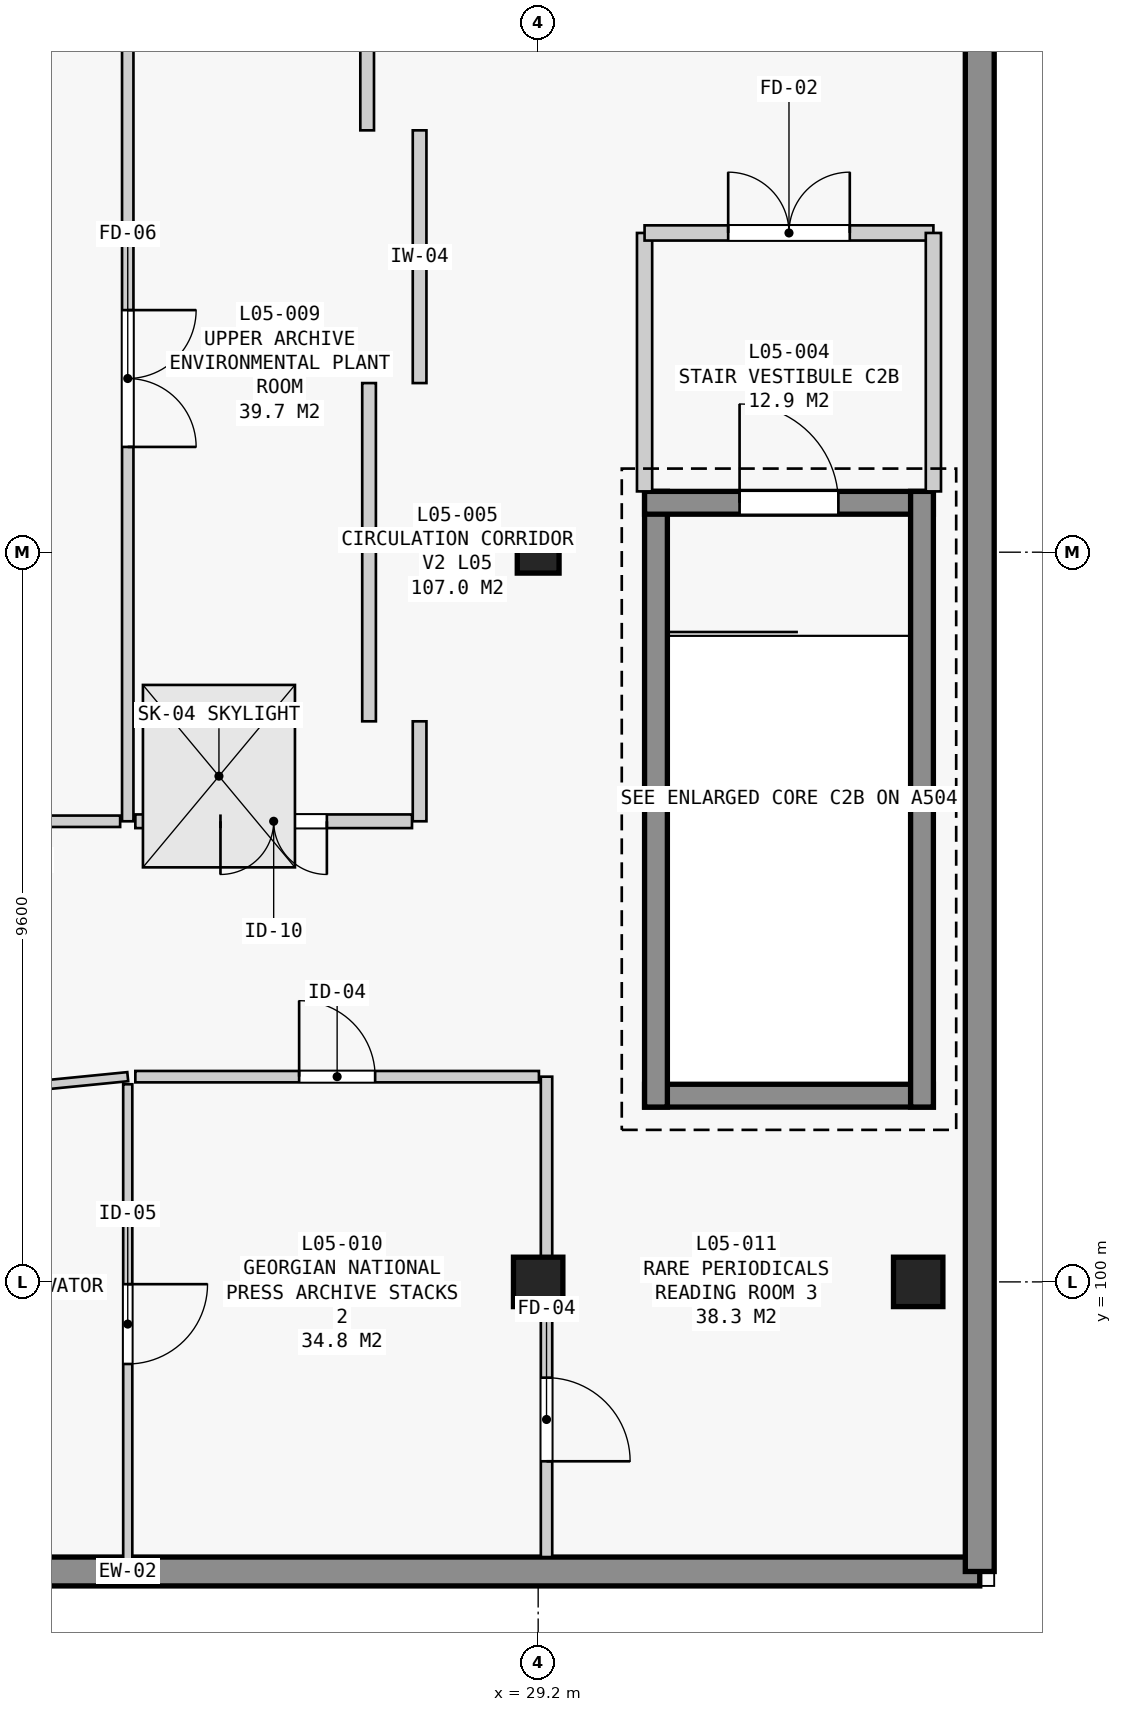
"""IFC4 building model, lengths in metres.
Left out: names, types, materials, properties, quantities, classifications, styles, units other than length and angle.
Written with IfcOpenShell. Run it as: python <this file> out.ifc"""

import sys

from ifc_helpers import new_model, si_unit, direction, frame, frame_2d, origin, origin_2d, place, context, subcontext, project, spatial, rectangle, extrude, element, fill, save


model = new_model("IFC4")
c1 = context("Model", 3, precision=1e-05, world=origin(), true_north=direction((0.0, 1.0)))
c2 = subcontext(c1, "Body", "Model", "MODEL_VIEW")
j1 = project(units=[si_unit("LENGTHUNIT", "METRE"), si_unit("PLANEANGLEUNIT", "RADIAN")], contexts=[c1])
p1 = place(None, origin())
s1 = spatial("IfcSite", under=j1, at=p1, CompositionType="ELEMENT")
p2 = place(p1, origin())
s2 = spatial("IfcBuilding", under=s1, at=p2, CompositionType="ELEMENT")
p3 = place(p2, frame((0.0, 0.0, 22.5)))
s3 = spatial("IfcBuildingStorey", under=s2, at=p3, CompositionType="ELEMENT", Elevation=22.5)
p4 = place(p3, frame((29.2, 100.0, 0.0), z_axis=(0.0, 0.0, 1.0), x_axis=(1.0, 0.0, 0.0)))
e1 = element("IfcColumn", 1, at=p4, inside=s3, PredefinedType="COLUMN", context=c2, shape_type="SweptSolid", body=[
    extrude(rectangle(XDim=0.65, YDim=0.65, at=origin_2d()), origin(), (0.0, 0.0, 1.0), 4.2),
])
p5 = place(p3, frame((29.2, 109.6, 0.0), z_axis=(0.0, 0.0, 1.0), x_axis=(1.0, 0.0, 0.0)))
e2 = element("IfcColumn", 2, at=p5, inside=s3, PredefinedType="COLUMN", context=c2, shape_type="SweptSolid", body=[
    extrude(rectangle(XDim=0.55, YDim=0.55, at=origin_2d()), origin(), (0.0, 0.0, 1.0), 4.2),
])
p6 = place(p3, frame((34.2, 100.0, 0.0), z_axis=(0.0, 0.0, 1.0), x_axis=(1.0, 0.0, 0.0)))
e3 = element("IfcColumn", 3, at=p6, inside=s3, PredefinedType="COLUMN", context=c2, shape_type="SweptSolid", body=[
    extrude(rectangle(XDim=0.65, YDim=0.65, at=origin_2d()), origin(), (0.0, 0.0, 1.0), 4.2),
])
p7 = place(p3, frame((35.01, 96.19, 0.0), z_axis=(0.0, 0.0, 1.0), x_axis=(-1.0, 0.0, 0.0)))
e4 = element("IfcWall", 4, at=p7, inside=s3, PredefinedType="STANDARD", context=c2, shape_type="SweptSolid", body=[
    extrude(rectangle(XDim=22.42, YDim=0.38, at=frame_2d((11.21, 0.0))), origin(), (0.0, 0.0, 1.0), 3.94),
])
p8 = place(p3, frame((35.01, 117.81, 0.0), z_axis=(0.0, 0.0, 1.0), x_axis=(0.0, -1.0, 0.0)))
e5 = element("IfcWall", 5, at=p8, inside=s3, PredefinedType="STANDARD", context=c2, shape_type="SweptSolid", body=[
    extrude(rectangle(XDim=21.62, YDim=0.38, at=frame_2d((10.81, 0.0))), origin(), (0.0, 0.0, 1.0), 3.94),
])
p9 = place(p3, frame((34.4, 102.45, 0.0), z_axis=(0.0, 0.0, 1.0), x_axis=(-1.0, 0.0, 0.0)))
e6 = element("IfcWall", 6, at=p9, inside=s3, PredefinedType="SHEAR", context=c2, shape_type="SweptSolid", body=[
    extrude(rectangle(XDim=3.8, YDim=0.3, at=frame_2d((1.9, 0.0))), origin(), (0.0, 0.0, 1.0), 4.2),
])
p10 = place(p3, frame((30.75, 102.3, 0.0), z_axis=(0.0, 0.0, 1.0), x_axis=(0.0, 1.0, 0.0)))
e7 = element("IfcWall", 7, at=p10, inside=s3, PredefinedType="SHEAR", context=c2, shape_type="SweptSolid", body=[
    extrude(rectangle(XDim=8.1, YDim=0.3, at=frame_2d((4.05, 0.0))), origin(), (0.0, 0.0, 1.0), 4.2),
])
p11 = place(p3, frame((30.6, 110.25, 0.0), z_axis=(0.0, 0.0, 1.0), x_axis=(1.0, 0.0, 0.0)))
e8 = element("IfcWall", 8, at=p11, inside=s3, PredefinedType="SHEAR", context=c2, shape_type="SweptSolid", body=[
    extrude(rectangle(XDim=3.8, YDim=0.3, at=frame_2d((1.9, 0.0))), origin(), (0.0, 0.0, 1.0), 4.2),
])
p12 = place(p11, frame((1.25, 0.0, 0.0)))
e9 = element("IfcOpeningElement", 9, at=p12, cuts=e8, PredefinedType="OPENING", context=c2, shape_type="SweptSolid", body=[
    extrude(rectangle(XDim=1.3, YDim=2.2, at=frame_2d((0.65, 1.1))), frame((0.0, 0.16, 0.0), z_axis=(0.0, -1.0, 0.0), x_axis=(1.0, 0.0, 0.0)), (0.0, 0.0, 1.0), 0.32),
])
p13 = place(p3, frame((34.25, 110.4, 0.0), z_axis=(0.0, 0.0, 1.0), x_axis=(0.0, -1.0, 0.0)))
e10 = element("IfcWall", 10, at=p13, inside=s3, PredefinedType="SHEAR", context=c2, shape_type="SweptSolid", body=[
    extrude(rectangle(XDim=8.1, YDim=0.3, at=frame_2d((4.05, 0.0))), origin(), (0.0, 0.0, 1.0), 4.2),
])
p14 = place(p3, frame((30.6, 110.4, 0.0), z_axis=(0.0, 0.0, 1.0), x_axis=(0.0, 1.0, 0.0)))
e11 = element("IfcWall", 11, at=p14, inside=s3, PredefinedType="STANDARD", context=c2, shape_type="SweptSolid", body=[
    extrude(rectangle(XDim=3.4, YDim=0.2, at=frame_2d((1.7, 0.0))), origin(), (0.0, 0.0, 1.0), 4.2),
])
p15 = place(p3, frame((30.6, 113.8, 0.0), z_axis=(0.0, 0.0, 1.0), x_axis=(1.0, 0.0, 0.0)))
e12 = element("IfcWall", 12, at=p15, inside=s3, PredefinedType="STANDARD", context=c2, shape_type="SweptSolid", body=[
    extrude(rectangle(XDim=3.8, YDim=0.2, at=frame_2d((1.9, 0.0))), origin(), (0.0, 0.0, 1.0), 4.2),
])
p16 = place(p15, frame((1.1, 0.0, 0.0)))
e13 = element("IfcOpeningElement", 13, at=p16, cuts=e12, PredefinedType="OPENING", context=c2, shape_type="SweptSolid", body=[
    extrude(rectangle(XDim=1.6, YDim=2.2, at=frame_2d((0.8, 1.1))), frame((0.0, 0.11, 0.0), z_axis=(0.0, -1.0, 0.0), x_axis=(1.0, 0.0, 0.0)), (0.0, 0.0, 1.0), 0.22),
])
p17 = place(p3, frame((34.4, 113.8, 0.0), z_axis=(0.0, 0.0, 1.0), x_axis=(0.0, -1.0, 0.0)))
e14 = element("IfcWall", 14, at=p17, inside=s3, PredefinedType="STANDARD", context=c2, shape_type="SweptSolid", body=[
    extrude(rectangle(XDim=3.4, YDim=0.2, at=frame_2d((1.7, 0.0))), origin(), (0.0, 0.0, 1.0), 4.2),
])
p18 = place(p3, frame((23.8, 117.71, 0.0), z_axis=(0.0, 0.0, 1.0), x_axis=(0.0, -1.0, 0.0)))
e15 = element("IfcWall", 15, at=p18, inside=s3, PredefinedType="PARTITIONING", context=c2, shape_type="SweptSolid", body=[
    extrude(rectangle(XDim=11.65, YDim=0.15, at=frame_2d((5.825, 0.0))), origin(), (0.0, 0.0, 1.0), 3.94),
])
p19 = place(p18, frame((4.925, 0.0, 0.0)))
e16 = element("IfcOpeningElement", 16, at=p19, cuts=e15, PredefinedType="OPENING", context=c2, shape_type="SweptSolid", body=[
    extrude(rectangle(XDim=1.8, YDim=2.2, at=frame_2d((0.9, 1.1))), frame((0.0, 0.085, 0.0), z_axis=(0.0, -1.0, 0.0), x_axis=(1.0, 0.0, 0.0)), (0.0, 0.0, 1.0), 0.17),
])
p20 = place(p3, frame((23.7, 106.06, 0.0), z_axis=(0.0, 0.0, 1.0), x_axis=(-1.0, 0.0, 0.0)))
e17 = element("IfcWall", 17, at=p20, inside=s3, PredefinedType="PARTITIONING", context=c2, shape_type="SweptSolid", body=[
    extrude(rectangle(XDim=4.2, YDim=0.15, at=frame_2d((2.1, 0.0))), origin(), (0.0, 0.0, 1.0), 3.94),
])
p21 = place(p3, frame((19.96, 102.32, 0.0), z_axis=(0.0, 0.0, 1.0), x_axis=(0.995142491343, 0.098445019806, 0.0)))
e18 = element("IfcWall", 18, at=p21, inside=s3, PredefinedType="PARTITIONING", context=c2, shape_type="SweptSolid", body=[
    extrude(rectangle(XDim=3.859, YDim=0.12, at=frame_2d((1.929, 0.0))), origin(), (0.0, 0.0, 1.0), 3.94),
])
p22 = place(p3, frame((23.8, 102.6, 0.0), z_axis=(0.0, 0.0, 1.0), x_axis=(0.0, -1.0, 0.0)))
e19 = element("IfcWall", 19, at=p22, inside=s3, PredefinedType="PARTITIONING", context=c2, shape_type="SweptSolid", body=[
    extrude(rectangle(XDim=6.31, YDim=0.12, at=frame_2d((3.155, 0.0))), origin(), (0.0, 0.0, 1.0), 3.07),
])
p23 = place(p22, frame((2.63, 0.0, 0.0)))
e20 = element("IfcOpeningElement", 20, at=p23, cuts=e19, PredefinedType="OPENING", context=c2, shape_type="SweptSolid", body=[
    extrude(rectangle(XDim=1.05, YDim=2.15, at=frame_2d((0.525, 1.075))), frame((0.0, 0.07, 0.0), z_axis=(0.0, -1.0, 0.0), x_axis=(1.0, 0.0, 0.0)), (0.0, 0.0, 1.0), 0.14),
])
p24 = place(p3, frame((26.95, 117.71, 0.0), z_axis=(0.0, 0.0, 1.0), x_axis=(0.0, -1.0, 0.0)))
e21 = element("IfcWall", 21, at=p24, inside=s3, PredefinedType="PARTITIONING", context=c2, shape_type="SweptSolid", body=[
    extrude(rectangle(XDim=2.56, YDim=0.18, at=frame_2d((1.28, 0.0))), origin(), (0.0, 0.0, 1.0), 3.94),
])
p25 = place(p3, frame((27.64, 115.15, 0.0), z_axis=(0.0, 0.0, 1.0), x_axis=(0.0, -1.0, 0.0)))
e22 = element("IfcWall", 22, at=p25, inside=s3, PredefinedType="PARTITIONING", context=c2, shape_type="SweptSolid", body=[
    extrude(rectangle(XDim=3.325, YDim=0.18, at=frame_2d((1.663, 0.0))), origin(), (0.0, 0.0, 1.0), 3.94),
])
p26 = place(p3, frame((26.975, 111.825, 0.0), z_axis=(0.0, 0.0, 1.0), x_axis=(0.0, -1.0, 0.0)))
e23 = element("IfcWall", 23, at=p26, inside=s3, PredefinedType="PARTITIONING", context=c2, shape_type="SweptSolid", body=[
    extrude(rectangle(XDim=4.45, YDim=0.18, at=frame_2d((2.225, 0.0))), origin(), (0.0, 0.0, 1.0), 3.94),
])
p27 = place(p3, frame((27.64, 107.375, 0.0), z_axis=(0.0, 0.0, 1.0), x_axis=(0.0, -1.0, 0.0)))
e24 = element("IfcWall", 24, at=p27, inside=s3, PredefinedType="PARTITIONING", context=c2, shape_type="SweptSolid", body=[
    extrude(rectangle(XDim=1.315, YDim=0.18, at=frame_2d((0.657, 0.0))), origin(), (0.0, 0.0, 1.0), 3.94),
])
p28 = place(p3, frame((27.54, 106.06, 0.0), z_axis=(0.0, 0.0, 1.0), x_axis=(-1.0, 0.0, 0.0)))
e25 = element("IfcWall", 25, at=p28, inside=s3, PredefinedType="PARTITIONING", context=c2, shape_type="SweptSolid", body=[
    extrude(rectangle(XDim=3.64, YDim=0.18, at=frame_2d((1.82, 0.0))), origin(), (0.0, 0.0, 1.0), 3.94),
])
p29 = place(p28, frame((1.12, 0.0, 0.0)))
e26 = element("IfcOpeningElement", 26, at=p29, cuts=e25, PredefinedType="OPENING", context=c2, shape_type="SweptSolid", body=[
    extrude(rectangle(XDim=1.4, YDim=2.2, at=frame_2d((0.7, 1.1))), frame((0.0, 0.1, 0.0), z_axis=(0.0, -1.0, 0.0), x_axis=(1.0, 0.0, 0.0)), (0.0, 0.0, 1.0), 0.2),
])
p30 = place(p3, frame((29.31, 102.7, 0.0), z_axis=(0.0, 0.0, 1.0), x_axis=(0.0, -1.0, 0.0)))
e27 = element("IfcWall", 27, at=p30, inside=s3, PredefinedType="PARTITIONING", context=c2, shape_type="SweptSolid", body=[
    extrude(rectangle(XDim=6.32, YDim=0.15, at=frame_2d((3.16, 0.0))), origin(), (0.0, 0.0, 1.0), 3.17),
])
p31 = place(p30, frame((3.96, 0.0, 0.0)))
e28 = element("IfcOpeningElement", 28, at=p31, cuts=e27, PredefinedType="OPENING", context=c2, shape_type="SweptSolid", body=[
    extrude(rectangle(XDim=1.1, YDim=2.15, at=frame_2d((0.55, 1.075))), frame((0.0, 0.085, 0.0), z_axis=(0.0, -1.0, 0.0), x_axis=(1.0, 0.0, 0.0)), (0.0, 0.0, 1.0), 0.17),
])
p32 = place(p3, frame((23.9, 102.7, 0.0), z_axis=(0.0, 0.0, 1.0), x_axis=(1.0, 0.0, 0.0)))
e29 = element("IfcWall", 29, at=p32, inside=s3, PredefinedType="PARTITIONING", context=c2, shape_type="SweptSolid", body=[
    extrude(rectangle(XDim=5.31, YDim=0.15, at=frame_2d((2.655, 0.0))), origin(), (0.0, 0.0, 1.0), 3.17),
])
p33 = place(p32, frame((2.155, 0.0, 0.0)))
e30 = element("IfcOpeningElement", 30, at=p33, cuts=e29, PredefinedType="OPENING", context=c2, shape_type="SweptSolid", body=[
    extrude(rectangle(XDim=1.0, YDim=2.15, at=frame_2d((0.5, 1.075))), frame((0.0, 0.085, 0.0), z_axis=(0.0, -1.0, 0.0), x_axis=(1.0, 0.0, 0.0)), (0.0, 0.0, 1.0), 0.17),
])
p34 = place(p2, frame((0.0, 0.0, 26.7)))
p35 = place(p34, frame((0.0, 0.0, -0.26)))
p36 = place(p35, frame((25.0, 106.654, 0.0)))
p37 = place(p36, frame((0.0, 0.0, 0.21)))
e31 = element("IfcWindow", 31, at=p37, inside=s3, PartitioningType="SINGLE_PANEL", PredefinedType="SKYLIGHT", context=c2, shape_type="SweptSolid", body=[
    extrude(rectangle(XDim=2.0, YDim=2.4, at=origin_2d()), origin(), (0.0, 0.0, 1.0), 0.05),
])
p38 = place(p12, origin())
e32 = element("IfcDoor", 32, at=p38, inside=s3, OperationType="SINGLE_SWING_LEFT", PredefinedType="DOOR", context=c2, shape_type="SweptSolid", body=[
    extrude(rectangle(XDim=1.3, YDim=2.2, at=frame_2d((0.65, 1.1))), frame((0.0, 0.025, 0.0), z_axis=(0.0, -1.0, 0.0), x_axis=(1.0, 0.0, 0.0)), (0.0, 0.0, 1.0), 0.05),
])
fill(e9, e32)
p39 = place(p16, origin())
e33 = element("IfcDoor", 33, at=p39, inside=s3, OperationType="DOUBLE_DOOR_SINGLE_SWING", PredefinedType="DOOR", context=c2, shape_type="SweptSolid", body=[
    extrude(rectangle(XDim=1.6, YDim=2.2, at=frame_2d((0.8, 1.1))), frame((0.0, 0.025, 0.0), z_axis=(0.0, -1.0, 0.0), x_axis=(1.0, 0.0, 0.0)), (0.0, 0.0, 1.0), 0.05),
])
fill(e13, e33)
p40 = place(p19, origin())
e34 = element("IfcDoor", 34, at=p40, inside=s3, OperationType="DOUBLE_DOOR_SINGLE_SWING", PredefinedType="DOOR", context=c2, shape_type="SweptSolid", body=[
    extrude(rectangle(XDim=1.8, YDim=2.2, at=frame_2d((0.9, 1.1))), frame((0.0, 0.025, 0.0), z_axis=(0.0, -1.0, 0.0), x_axis=(1.0, 0.0, 0.0)), (0.0, 0.0, 1.0), 0.05),
])
fill(e16, e34)
p41 = place(p23, origin())
e35 = element("IfcDoor", 35, at=p41, inside=s3, OperationType="SINGLE_SWING_LEFT", PredefinedType="DOOR", context=c2, shape_type="SweptSolid", body=[
    extrude(rectangle(XDim=1.05, YDim=2.15, at=frame_2d((0.525, 1.075))), frame((0.0, 0.025, 0.0), z_axis=(0.0, -1.0, 0.0), x_axis=(1.0, 0.0, 0.0)), (0.0, 0.0, 1.0), 0.05),
])
fill(e20, e35)
p42 = place(p29, origin())
e36 = element("IfcDoor", 36, at=p42, inside=s3, OperationType="DOUBLE_DOOR_SINGLE_SWING", PredefinedType="DOOR", context=c2, shape_type="SweptSolid", body=[
    extrude(rectangle(XDim=1.4, YDim=2.2, at=frame_2d((0.7, 1.1))), frame((0.0, 0.025, 0.0), z_axis=(0.0, -1.0, 0.0), x_axis=(1.0, 0.0, 0.0)), (0.0, 0.0, 1.0), 0.05),
])
fill(e26, e36)
p43 = place(p31, origin())
e37 = element("IfcDoor", 37, at=p43, inside=s3, OperationType="SINGLE_SWING_RIGHT", PredefinedType="DOOR", context=c2, shape_type="SweptSolid", body=[
    extrude(rectangle(XDim=1.1, YDim=2.15, at=frame_2d((0.55, 1.075))), frame((0.0, 0.025, 0.0), z_axis=(0.0, -1.0, 0.0), x_axis=(1.0, 0.0, 0.0)), (0.0, 0.0, 1.0), 0.05),
])
fill(e28, e37)
p44 = place(p33, origin())
e38 = element("IfcDoor", 38, at=p44, inside=s3, OperationType="SINGLE_SWING_LEFT", PredefinedType="DOOR", context=c2, shape_type="SweptSolid", body=[
    extrude(rectangle(XDim=1.0, YDim=2.15, at=frame_2d((0.5, 1.075))), frame((0.0, 0.025, 0.0), z_axis=(0.0, -1.0, 0.0), x_axis=(1.0, 0.0, 0.0)), (0.0, 0.0, 1.0), 0.05),
])
fill(e30, e38)
save(model, sys.argv[1])
